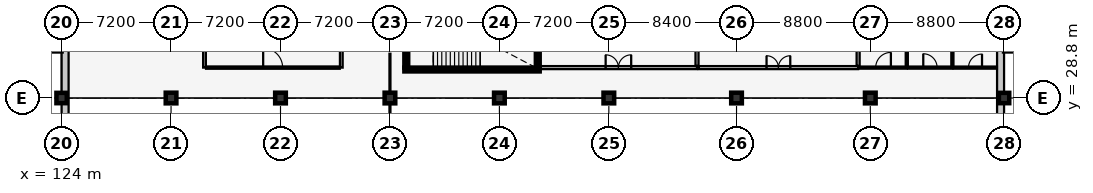
"""IFC4 building model, lengths in metres.
Left out: names, types, materials, properties, quantities, classifications, styles, units other than length and angle.
Written with IfcOpenShell. Run it as: python <this file> out.ifc"""

import sys

from ifc_helpers import new_model, si_unit, direction, frame, frame_2d, origin, origin_2d, place, context, subcontext, project, spatial, rectangle, extrude, element, fill, save


model = new_model("IFC4")
c1 = context("Model", 3, precision=1e-05, world=origin(), true_north=direction((0.0, 1.0)))
c2 = subcontext(c1, "Body", "Model", "MODEL_VIEW")
j1 = project(units=[si_unit("LENGTHUNIT", "METRE"), si_unit("PLANEANGLEUNIT", "RADIAN")], contexts=[c1])
p1 = place(None, origin())
s1 = spatial("IfcSite", under=j1, at=p1, CompositionType="ELEMENT")
p2 = place(p1, origin())
s2 = spatial("IfcBuilding", under=s1, at=p2, CompositionType="ELEMENT")
p3 = place(p2, frame((0.0, 0.0, 5.4)))
s3 = spatial("IfcBuildingStorey", under=s2, at=p3, CompositionType="ELEMENT", Elevation=5.4)
p4 = place(p3, frame((124.0, 28.8, 0.0), z_axis=(0.0, 0.0, 1.0), x_axis=(1.0, 0.0, 0.0)))
e1 = element("IfcColumn", 1, at=p4, inside=s3, PredefinedType="COLUMN", context=c2, shape_type="SweptSolid", body=[
    extrude(rectangle(XDim=0.68, YDim=0.68, at=origin_2d()), origin(), (0.0, 0.0, 1.0), 4.2),
])
for number, where, z_axis, x_axis in (
    (2, (131.2, 28.8, 0.0), (0.0, 0.0, 1.0), (1.0, 0.0, 0.0)),
    (3, (138.4, 28.8, 0.0), (0.0, 0.0, 1.0), (1.0, 0.0, 0.0)),
    (4, (145.6, 28.8, 0.0), (0.0, 0.0, 1.0), (1.0, 0.0, 0.0)),
    (5, (152.8, 28.8, 0.0), (0.0, 0.0, 1.0), (1.0, 0.0, 0.0)),
    (6, (160.0, 28.8, 0.0), (0.0, 0.0, 1.0), (1.0, 0.0, 0.0)),
    (7, (168.4, 28.8, 0.0), (0.0, 0.0, 1.0), (1.0, 0.0, 0.0)),
    (8, (177.2, 28.8, 0.0), (0.0, 0.0, 1.0), (1.0, 0.0, 0.0)),
):
    element("IfcColumn", number, at=place(p3, frame(where, z_axis=z_axis, x_axis=x_axis)), inside=s3, PredefinedType="COLUMN", context=c2, shape_type="SweptSolid", body=[
        extrude(rectangle(XDim=0.7, YDim=0.7, at=origin_2d()), origin(), (0.0, 0.0, 1.0), 4.2),
    ])
p5 = place(p3, frame((186.0, 28.8, 0.0), z_axis=(0.0, 0.0, 1.0), x_axis=(1.0, 0.0, 0.0)))
e9 = element("IfcColumn", 9, at=p5, inside=s3, PredefinedType="COLUMN", context=c2, shape_type="SweptSolid", body=[
    extrude(rectangle(XDim=0.68, YDim=0.68, at=origin_2d()), origin(), (0.0, 0.0, 1.0), 4.2),
])
p6 = place(p3, frame((185.77, 38.4, 0.0), z_axis=(0.0, 0.0, 1.0), x_axis=(0.0, -1.0, 0.0)))
e10 = element("IfcWall", 10, at=p6, inside=s3, PredefinedType="SOLIDWALL", context=c2, shape_type="SweptSolid", body=[
    extrude(rectangle(XDim=38.4, YDim=0.46, at=frame_2d((19.2, 0.0))), origin(), (0.0, 0.0, 1.0), 3.095),
])
p7 = place(p6, frame((1.345, 0.0, 0.9)))
e11 = element("IfcOpeningElement", 11, at=p7, cuts=e10, PredefinedType="OPENING", context=c2, shape_type="SweptSolid", body=[
    extrude(rectangle(XDim=1.15, YDim=1.6, at=frame_2d((0.575, 0.8))), frame((0.0, 0.242, 0.0), z_axis=(0.0, -1.0, 0.0), x_axis=(1.0, 0.0, 0.0)), (0.0, 0.0, 1.0), 0.484),
])
p8 = place(p6, frame((5.135, 0.0, 0.9)))
e12 = element("IfcOpeningElement", 12, at=p8, cuts=e10, PredefinedType="OPENING", context=c2, shape_type="SweptSolid", body=[
    extrude(rectangle(XDim=1.25, YDim=1.6, at=frame_2d((0.625, 0.8))), frame((0.0, 0.242, 0.0), z_axis=(0.0, -1.0, 0.0), x_axis=(1.0, 0.0, 0.0)), (0.0, 0.0, 1.0), 0.484),
])
p9 = place(p3, frame((124.23, 0.0, 0.0), z_axis=(0.0, 0.0, 1.0), x_axis=(0.0, 1.0, 0.0)))
e13 = element("IfcWall", 13, at=p9, inside=s3, PredefinedType="SOLIDWALL", context=c2, shape_type="SweptSolid", body=[
    extrude(rectangle(XDim=38.4, YDim=0.46, at=frame_2d((19.2, 0.0))), origin(), (0.0, 0.0, 1.0), 3.095),
])
p10 = place(p9, frame((32.015, 0.0, 0.9)))
e14 = element("IfcOpeningElement", 14, at=p10, cuts=e13, PredefinedType="OPENING", context=c2, shape_type="SweptSolid", body=[
    extrude(rectangle(XDim=1.25, YDim=1.45, at=frame_2d((0.625, 0.725))), frame((0.0, 0.242, 0.0), z_axis=(0.0, -1.0, 0.0), x_axis=(1.0, 0.0, 0.0)), (0.0, 0.0, 1.0), 0.484),
])
p11 = place(p9, frame((35.805, 0.0, 0.9)))
e15 = element("IfcOpeningElement", 15, at=p11, cuts=e13, PredefinedType="OPENING", context=c2, shape_type="SweptSolid", body=[
    extrude(rectangle(XDim=1.35, YDim=1.45, at=frame_2d((0.675, 0.725))), frame((0.0, 0.242, 0.0), z_axis=(0.0, -1.0, 0.0), x_axis=(1.0, 0.0, 0.0)), (0.0, 0.0, 1.0), 0.484),
])
p12 = place(p3, frame((146.55, 30.675, 0.0), z_axis=(0.0, 0.0, 1.0), x_axis=(1.0, 0.0, 0.0)))
e16 = element("IfcWall", 16, at=p12, inside=s3, PredefinedType="SHEAR", context=c2, shape_type="SweptSolid", body=[
    extrude(rectangle(XDim=8.9, YDim=0.25, at=frame_2d((4.45, 0.0))), origin(), (0.0, 0.0, 1.0), 3.94),
])
p13 = place(p3, frame((146.675, 34.35, 0.0), z_axis=(0.0, 0.0, 1.0), x_axis=(0.0, -1.0, 0.0)))
e17 = element("IfcWall", 17, at=p13, inside=s3, PredefinedType="SHEAR", context=c2, shape_type="SweptSolid", body=[
    extrude(rectangle(XDim=3.55, YDim=0.25, at=frame_2d((1.775, 0.0))), origin(), (0.0, 0.0, 1.0), 3.94),
])
p14 = place(p13, frame((1.2, 0.0, 0.0)))
e18 = element("IfcOpeningElement", 18, at=p14, cuts=e17, PredefinedType="OPENING", context=c2, shape_type="SweptSolid", body=[
    extrude(rectangle(XDim=1.15, YDim=2.15, at=frame_2d((0.575, 1.075))), frame((0.0, 0.137, 0.0), z_axis=(0.0, -1.0, 0.0), x_axis=(1.0, 0.0, 0.0)), (0.0, 0.0, 1.0), 0.274),
])
p15 = place(p3, frame((155.325, 30.8, 0.0), z_axis=(0.0, 0.0, 1.0), x_axis=(0.0, 1.0, 0.0)))
e19 = element("IfcWall", 19, at=p15, inside=s3, PredefinedType="SHEAR", context=c2, shape_type="SweptSolid", body=[
    extrude(rectangle(XDim=3.55, YDim=0.25, at=frame_2d((1.775, 0.0))), origin(), (0.0, 0.0, 1.0), 3.94),
])
for number, where, z_axis, x_axis in (
    (20, (142.4, 30.8, 0.0), (0.0, 0.0, 1.0), (0.0, 1.0, 0.0)),
    (21, (133.4, 30.8, 0.0), (0.0, 0.0, 1.0), (0.0, 1.0, 0.0)),
):
    element("IfcWall", number, at=place(p3, frame(where, z_axis=z_axis, x_axis=x_axis)), inside=s3, PredefinedType="PARTITIONING", context=c2, shape_type="SweptSolid", body=[
        extrude(rectangle(XDim=7.13, YDim=0.18, at=frame_2d((3.565, 0.0))), origin(), (0.0, 0.0, 1.0), 3.94),
    ])
p16 = place(p3, frame((133.5, 30.8, 0.0), z_axis=(0.0, 0.0, 1.0), x_axis=(1.0, 0.0, 0.0)))
e22 = element("IfcWall", 22, at=p16, inside=s3, PredefinedType="PARTITIONING", context=c2, shape_type="SweptSolid", body=[
    extrude(rectangle(XDim=8.8, YDim=0.15, at=frame_2d((4.4, 0.0))), origin(), (0.0, 0.0, 1.0), 3.94),
])
p17 = place(p16, frame((3.76, 0.0, 0.0)))
e23 = element("IfcOpeningElement", 23, at=p17, cuts=e22, PredefinedType="OPENING", context=c2, shape_type="SweptSolid", body=[
    extrude(rectangle(XDim=1.28, YDim=2.2, at=frame_2d((0.64, 1.1))), frame((0.0, 0.087, 0.0), z_axis=(0.0, -1.0, 0.0), x_axis=(1.0, 0.0, 0.0)), (0.0, 0.0, 1.0), 0.174),
])
p18 = place(p3, frame((155.46, 30.8, 0.0), z_axis=(0.0, 0.0, 1.0), x_axis=(1.0, 0.0, 0.0)))
e24 = element("IfcWall", 24, at=p18, inside=s3, PredefinedType="PARTITIONING", context=c2, shape_type="SweptSolid", body=[
    extrude(rectangle(XDim=10.34, YDim=0.2, at=frame_2d((5.17, 0.0))), origin(), (0.0, 0.0, 1.0), 3.94),
])
p19 = place(p18, frame((4.33, 0.0, 0.0)))
e25 = element("IfcOpeningElement", 25, at=p19, cuts=e24, PredefinedType="OPENING", context=c2, shape_type="SweptSolid", body=[
    extrude(rectangle(XDim=1.68, YDim=2.3, at=frame_2d((0.84, 1.15))), frame((0.0, 0.112, 0.0), z_axis=(0.0, -1.0, 0.0), x_axis=(1.0, 0.0, 0.0)), (0.0, 0.0, 1.0), 0.224),
])
p20 = place(p3, frame((165.8, 30.91, 0.0), z_axis=(0.0, 0.0, 1.0), x_axis=(0.0, 1.0, 0.0)))
e26 = element("IfcWall", 26, at=p20, inside=s3, PredefinedType="PARTITIONING", context=c2, shape_type="SweptSolid", body=[
    extrude(rectangle(XDim=7.02, YDim=0.2, at=frame_2d((3.51, 0.0))), origin(), (0.0, 0.0, 1.0), 3.94),
])
p21 = place(p3, frame((165.91, 30.8, 0.0), z_axis=(0.0, 0.0, 1.0), x_axis=(1.0, 0.0, 0.0)))
e27 = element("IfcWall", 27, at=p21, inside=s3, PredefinedType="PARTITIONING", context=c2, shape_type="SweptSolid", body=[
    extrude(rectangle(XDim=10.49, YDim=0.2, at=frame_2d((5.245, 0.0))), origin(), (0.0, 0.0, 1.0), 3.94),
])
p22 = place(p21, frame((4.465, 0.0, 0.0)))
e28 = element("IfcOpeningElement", 28, at=p22, cuts=e27, PredefinedType="OPENING", context=c2, shape_type="SweptSolid", body=[
    extrude(rectangle(XDim=1.56, YDim=2.25, at=frame_2d((0.78, 1.125))), frame((0.0, 0.112, 0.0), z_axis=(0.0, -1.0, 0.0), x_axis=(1.0, 0.0, 0.0)), (0.0, 0.0, 1.0), 0.224),
])
p23 = place(p3, frame((176.4, 30.91, 0.0), z_axis=(0.0, 0.0, 1.0), x_axis=(0.0, 1.0, 0.0)))
e29 = element("IfcWall", 29, at=p23, inside=s3, PredefinedType="PARTITIONING", context=c2, shape_type="SweptSolid", body=[
    extrude(rectangle(XDim=7.02, YDim=0.2, at=frame_2d((3.51, 0.0))), origin(), (0.0, 0.0, 1.0), 3.94),
])
p24 = place(p3, frame((176.51, 30.8, 0.0), z_axis=(0.0, 0.0, 1.0), x_axis=(1.0, 0.0, 0.0)))
e30 = element("IfcWall", 30, at=p24, inside=s3, PredefinedType="PARTITIONING", context=c2, shape_type="SweptSolid", body=[
    extrude(rectangle(XDim=3.09, YDim=0.14, at=frame_2d((1.545, 0.0))), origin(), (0.0, 0.0, 1.0), 3.94),
])
p25 = place(p24, frame((1.045, 0.0, 0.0)))
e31 = element("IfcOpeningElement", 31, at=p25, cuts=e30, PredefinedType="OPENING", context=c2, shape_type="SweptSolid", body=[
    extrude(rectangle(XDim=1.0, YDim=2.1, at=frame_2d((0.5, 1.05))), frame((0.0, 0.082, 0.0), z_axis=(0.0, -1.0, 0.0), x_axis=(1.0, 0.0, 0.0)), (0.0, 0.0, 1.0), 0.164),
])
p26 = place(p3, frame((179.6, 30.88, 0.0), z_axis=(0.0, 0.0, 1.0), x_axis=(0.0, 1.0, 0.0)))
e32 = element("IfcWall", 32, at=p26, inside=s3, PredefinedType="PARTITIONING", context=c2, shape_type="SweptSolid", body=[
    extrude(rectangle(XDim=7.05, YDim=0.14, at=frame_2d((3.525, 0.0))), origin(), (0.0, 0.0, 1.0), 3.94),
])
p27 = place(p3, frame((179.68, 30.8, 0.0), z_axis=(0.0, 0.0, 1.0), x_axis=(1.0, 0.0, 0.0)))
e33 = element("IfcWall", 33, at=p27, inside=s3, PredefinedType="PARTITIONING", context=c2, shape_type="SweptSolid", body=[
    extrude(rectangle(XDim=2.92, YDim=0.14, at=frame_2d((1.46, 0.0))), origin(), (0.0, 0.0, 1.0), 3.94),
])
p28 = place(p27, frame((1.005, 0.0, 0.0)))
e34 = element("IfcOpeningElement", 34, at=p28, cuts=e33, PredefinedType="OPENING", context=c2, shape_type="SweptSolid", body=[
    extrude(rectangle(XDim=0.91, YDim=2.06, at=frame_2d((0.455, 1.03))), frame((0.0, 0.082, 0.0), z_axis=(0.0, -1.0, 0.0), x_axis=(1.0, 0.0, 0.0)), (0.0, 0.0, 1.0), 0.164),
])
p29 = place(p3, frame((182.6, 30.88, 0.0), z_axis=(0.0, 0.0, 1.0), x_axis=(0.0, 1.0, 0.0)))
e35 = element("IfcWall", 35, at=p29, inside=s3, PredefinedType="PARTITIONING", context=c2, shape_type="SweptSolid", body=[
    extrude(rectangle(XDim=7.05, YDim=0.14, at=frame_2d((3.525, 0.0))), origin(), (0.0, 0.0, 1.0), 3.94),
])
p30 = place(p3, frame((182.68, 30.8, 0.0), z_axis=(0.0, 0.0, 1.0), x_axis=(1.0, 0.0, 0.0)))
e36 = element("IfcWall", 36, at=p30, inside=s3, PredefinedType="PARTITIONING", context=c2, shape_type="SweptSolid", body=[
    extrude(rectangle(XDim=2.85, YDim=0.14, at=frame_2d((1.425, 0.0))), origin(), (0.0, 0.0, 1.0), 3.94),
])
p31 = place(p30, frame((0.98, 0.0, 0.0)))
e37 = element("IfcOpeningElement", 37, at=p31, cuts=e36, PredefinedType="OPENING", context=c2, shape_type="SweptSolid", body=[
    extrude(rectangle(XDim=0.89, YDim=2.05, at=frame_2d((0.445, 1.025))), frame((0.0, 0.082, 0.0), z_axis=(0.0, -1.0, 0.0), x_axis=(1.0, 0.0, 0.0)), (0.0, 0.0, 1.0), 0.164),
])
p32 = place(p17, origin())
e38 = element("IfcDoor", 38, at=p32, inside=s3, OperationType="SINGLE_SWING_LEFT", PredefinedType="DOOR", context=c2, shape_type="SweptSolid", body=[
    extrude(rectangle(XDim=1.28, YDim=2.2, at=frame_2d((0.64, 1.1))), frame((0.0, 0.025, 0.0), z_axis=(0.0, -1.0, 0.0), x_axis=(1.0, 0.0, 0.0)), (0.0, 0.0, 1.0), 0.05),
])
fill(e23, e38)
p33 = place(p19, origin())
e39 = element("IfcDoor", 39, at=p33, inside=s3, OperationType="DOUBLE_DOOR_SINGLE_SWING", PredefinedType="DOOR", context=c2, shape_type="SweptSolid", body=[
    extrude(rectangle(XDim=1.68, YDim=2.3, at=frame_2d((0.84, 1.15))), frame((0.0, 0.025, 0.0), z_axis=(0.0, -1.0, 0.0), x_axis=(1.0, 0.0, 0.0)), (0.0, 0.0, 1.0), 0.05),
])
fill(e25, e39)
p34 = place(p22, origin())
e40 = element("IfcDoor", 40, at=p34, inside=s3, OperationType="DOUBLE_DOOR_SINGLE_SWING", PredefinedType="DOOR", context=c2, shape_type="SweptSolid", body=[
    extrude(rectangle(XDim=1.56, YDim=2.25, at=frame_2d((0.78, 1.125))), frame((0.0, 0.025, 0.0), z_axis=(0.0, -1.0, 0.0), x_axis=(1.0, 0.0, 0.0)), (0.0, 0.0, 1.0), 0.05),
])
fill(e28, e40)
p35 = place(p25, origin())
e41 = element("IfcDoor", 41, at=p35, inside=s3, OperationType="SINGLE_SWING_RIGHT", PredefinedType="DOOR", context=c2, shape_type="SweptSolid", body=[
    extrude(rectangle(XDim=1.0, YDim=2.1, at=frame_2d((0.5, 1.05))), frame((0.0, 0.025, 0.0), z_axis=(0.0, -1.0, 0.0), x_axis=(1.0, 0.0, 0.0)), (0.0, 0.0, 1.0), 0.05),
])
fill(e31, e41)
p36 = place(p28, origin())
e42 = element("IfcDoor", 42, at=p36, inside=s3, OperationType="SINGLE_SWING_LEFT", PredefinedType="DOOR", context=c2, shape_type="SweptSolid", body=[
    extrude(rectangle(XDim=0.91, YDim=2.06, at=frame_2d((0.455, 1.03))), frame((0.0, 0.025, 0.0), z_axis=(0.0, -1.0, 0.0), x_axis=(1.0, 0.0, 0.0)), (0.0, 0.0, 1.0), 0.05),
])
fill(e34, e42)
p37 = place(p31, origin())
e43 = element("IfcDoor", 43, at=p37, inside=s3, OperationType="SINGLE_SWING_RIGHT", PredefinedType="DOOR", context=c2, shape_type="SweptSolid", body=[
    extrude(rectangle(XDim=0.89, YDim=2.05, at=frame_2d((0.445, 1.025))), frame((0.0, 0.025, 0.0), z_axis=(0.0, -1.0, 0.0), x_axis=(1.0, 0.0, 0.0)), (0.0, 0.0, 1.0), 0.05),
])
fill(e37, e43)
save(model, sys.argv[1])
